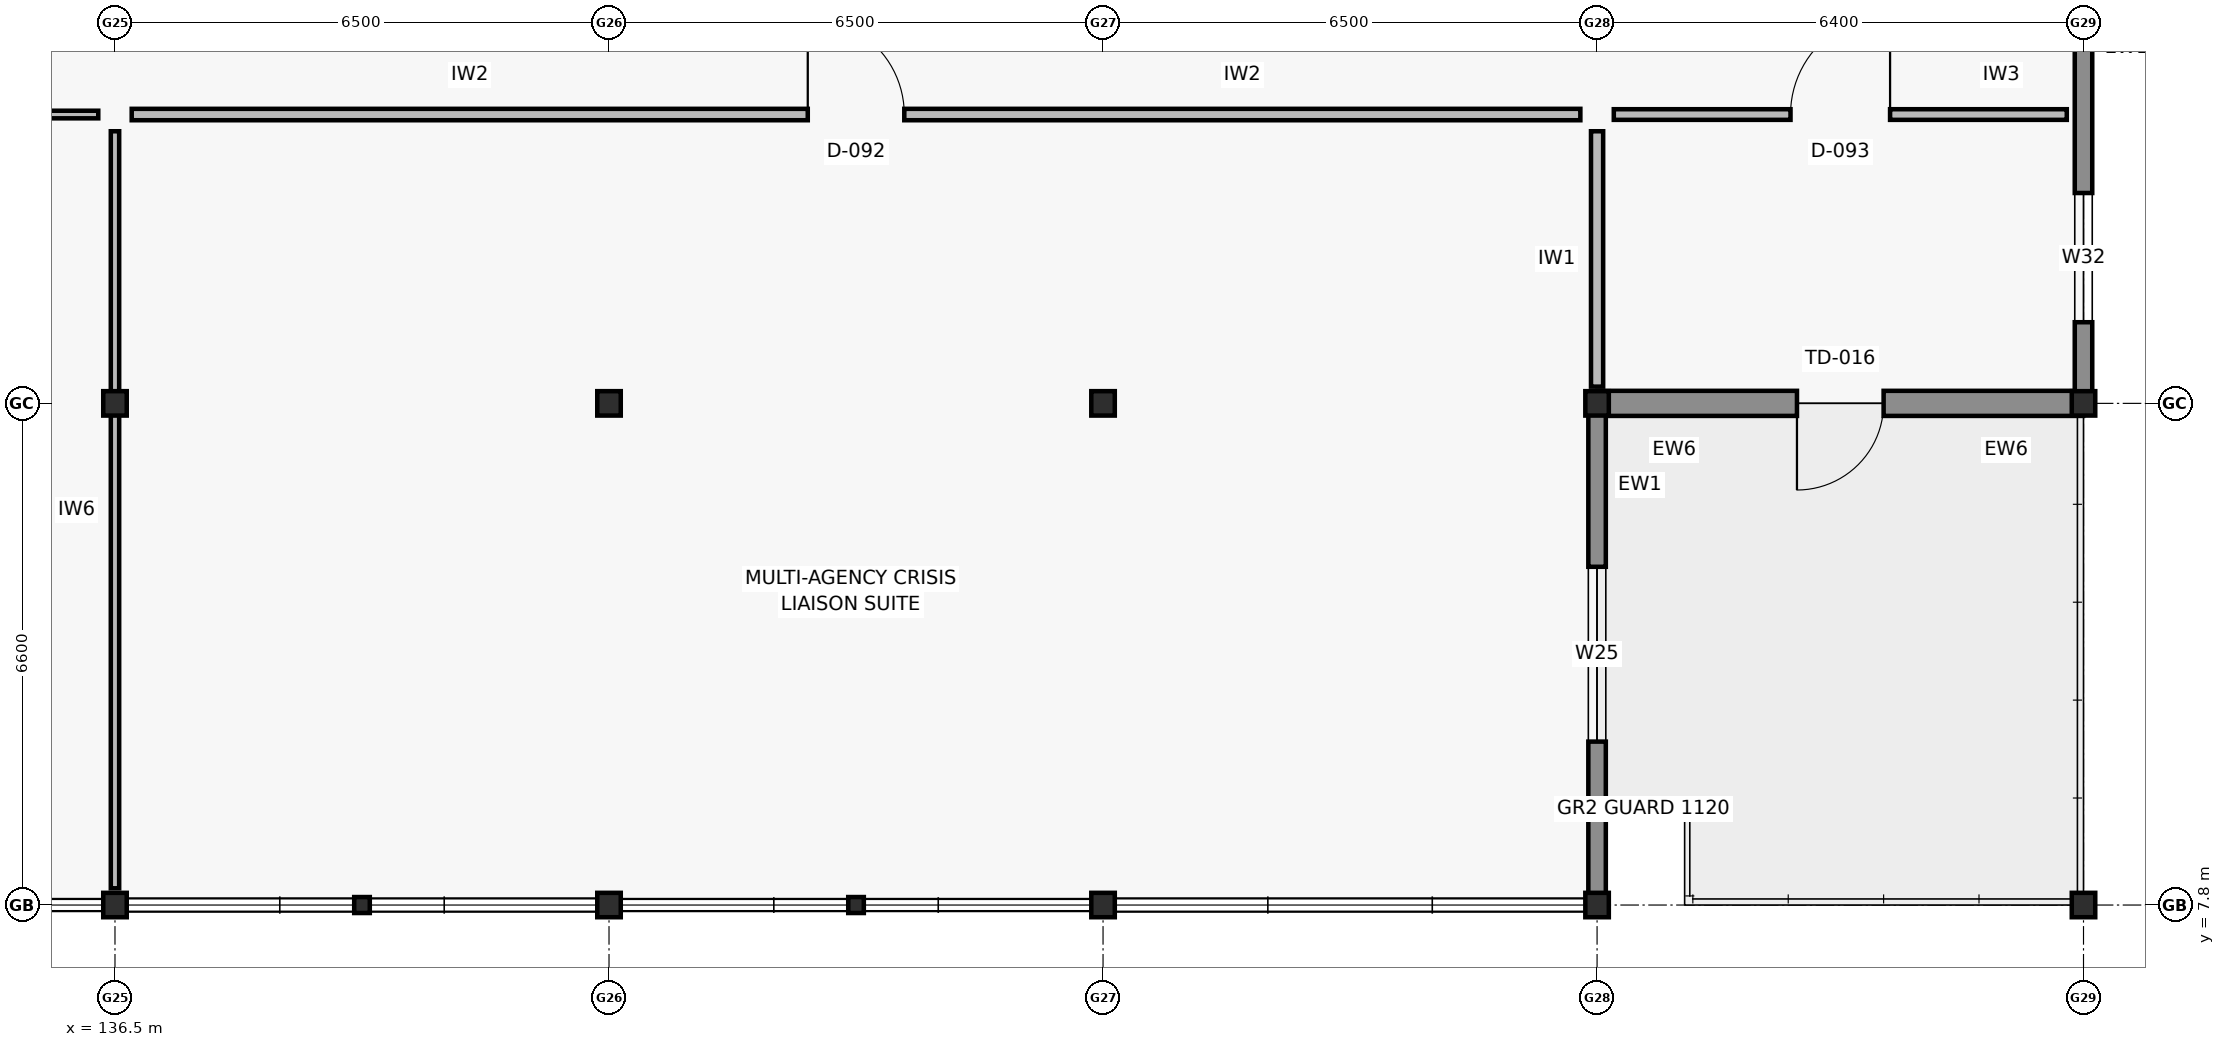
"""IFC4 building model, lengths in metres.
Left out: names, types, materials, properties, quantities, classifications, styles, units other than length and angle.
Written with IfcOpenShell. Run it as: python <this file> out.ifc"""

import sys

from ifc_helpers import new_model, si_unit, direction, frame, frame_2d, origin, origin_2d, place, context, subcontext, project, spatial, rectangle, i_section, extrude, element, fill, save


model = new_model("IFC4")
c1 = context("Model", 3, precision=1e-05, world=origin(), true_north=direction((0.0, 1.0)))
c2 = subcontext(c1, "Body", "Model", "MODEL_VIEW")
j1 = project(units=[si_unit("LENGTHUNIT", "METRE"), si_unit("PLANEANGLEUNIT", "RADIAN")], contexts=[c1])
p1 = place(None, origin())
s1 = spatial("IfcSite", under=j1, at=p1, CompositionType="ELEMENT")
p2 = place(p1, origin())
s2 = spatial("IfcBuilding", under=s1, at=p2, CompositionType="ELEMENT")
p3 = place(p2, frame((0.0, 0.0, 9.6)))
s3 = spatial("IfcBuildingStorey", under=s2, at=p3, CompositionType="ELEMENT", Elevation=9.6)
for number, where, z_axis, x_axis in (
    (1, (136.5, 7.8, 0.0), (0.0, 0.0, 1.0), (1.0, 0.0, 0.0)),
    (2, (136.5, 14.4, 0.0), (0.0, 0.0, 1.0), (1.0, 0.0, 0.0)),
    (3, (143.0, 7.8, 0.0), (0.0, 0.0, 1.0), (1.0, 0.0, 0.0)),
    (4, (143.0, 14.4, 0.0), (0.0, 0.0, 1.0), (1.0, 0.0, 0.0)),
    (5, (149.5, 7.8, 0.0), (0.0, 0.0, 1.0), (1.0, 0.0, 0.0)),
    (6, (149.5, 14.4, 0.0), (0.0, 0.0, 1.0), (1.0, 0.0, 0.0)),
    (7, (156.0, 7.8, 0.0), (0.0, 0.0, 1.0), (1.0, 0.0, 0.0)),
    (8, (156.0, 14.4, 0.0), (0.0, 0.0, 1.0), (1.0, 0.0, 0.0)),
    (9, (162.4, 7.8, 0.0), (0.0, 0.0, 1.0), (1.0, 0.0, 0.0)),
    (10, (162.4, 14.4, 0.0), (0.0, 0.0, 1.0), (1.0, 0.0, 0.0)),
):
    element("IfcColumn", number, at=place(p3, frame(where, z_axis=z_axis, x_axis=x_axis)), inside=s3, PredefinedType="COLUMN", context=c2, shape_type="SweptSolid", body=[
        extrude(i_section(OverallWidth=0.309, OverallDepth=0.321, WebThickness=0.014, FlangeThickness=0.022, FilletRadius=0.017, at=origin_2d()), origin(), (0.0, 0.0, 1.0), 3.9),
    ])
for number, where, z_axis, x_axis in (
    (11, (139.75, 7.8, 0.0), (0.0, 0.0, 1.0), (1.0, 0.0, 0.0)),
    (12, (146.25, 7.8, 0.0), (0.0, 0.0, 1.0), (1.0, 0.0, 0.0)),
):
    element("IfcColumn", number, at=place(p3, frame(where, z_axis=z_axis, x_axis=x_axis)), inside=s3, PredefinedType="PILASTER", context=c2, shape_type="SweptSolid", body=[
        extrude(i_section(OverallWidth=0.205, OverallDepth=0.21, WebThickness=0.009, FlangeThickness=0.014, FilletRadius=0.011, at=origin_2d()), origin(), (0.0, 0.0, 1.0), 3.9),
    ])
p4 = place(p3, frame((162.395, 14.4, 0.0), z_axis=(0.0, 0.0, 1.0), x_axis=(-1.0, 0.0, 0.0)))
e13 = element("IfcWall", 13, at=p4, inside=s3, PredefinedType="SOLIDWALL", context=c2, shape_type="SweptSolid", body=[
    extrude(rectangle(XDim=6.39, YDim=0.33, at=frame_2d((3.195, 0.0))), origin(), (0.0, 0.0, 1.0), 3.02),
])
p5 = place(p4, frame((2.625, 0.0, 0.0)))
e14 = element("IfcOpeningElement", 14, at=p5, cuts=e13, PredefinedType="OPENING", context=c2, shape_type="SweptSolid", body=[
    extrude(rectangle(XDim=1.14, YDim=2.14, at=frame_2d((0.57, 1.07))), frame((0.0, 0.175, 0.0), z_axis=(0.0, -1.0, 0.0), x_axis=(1.0, 0.0, 0.0)), (0.0, 0.0, 1.0), 0.35),
])
p6 = place(p3, frame((156.0, 14.395, 0.0), z_axis=(0.0, 0.0, 1.0), x_axis=(0.0, -1.0, 0.0)))
e15 = element("IfcWall", 15, at=p6, inside=s3, PredefinedType="SOLIDWALL", context=c2, shape_type="SweptSolid", body=[
    extrude(rectangle(XDim=6.59, YDim=0.23, at=frame_2d((3.295, 0.0))), origin(), (0.0, 0.0, 1.0), 3.02),
])
p7 = place(p6, frame((2.145, 0.0, 0.8)))
e16 = element("IfcOpeningElement", 16, at=p7, cuts=e15, PredefinedType="OPENING", context=c2, shape_type="SweptSolid", body=[
    extrude(rectangle(XDim=2.3, YDim=1.15, at=frame_2d((1.15, 0.575))), frame((0.0, 0.125, 0.0), z_axis=(0.0, -1.0, 0.0), x_axis=(1.0, 0.0, 0.0)), (0.0, 0.0, 1.0), 0.25),
])
p8 = place(p3, frame((162.4, 20.995, 0.0), z_axis=(0.0, 0.0, 1.0), x_axis=(0.0, -1.0, 0.0)))
e17 = element("IfcWall", 17, at=p8, inside=s3, PredefinedType="SOLIDWALL", context=c2, shape_type="SweptSolid", body=[
    extrude(rectangle(XDim=6.59, YDim=0.23, at=frame_2d((3.295, 0.0))), origin(), (0.0, 0.0, 1.0), 3.02),
])
p9 = place(p8, frame((3.827, 0.0, 0.8)))
e18 = element("IfcOpeningElement", 18, at=p9, cuts=e17, PredefinedType="OPENING", context=c2, shape_type="SweptSolid", body=[
    extrude(rectangle(XDim=1.7, YDim=1.25, at=frame_2d((0.85, 0.625))), frame((0.0, 0.125, 0.0), z_axis=(0.0, -1.0, 0.0), x_axis=(1.0, 0.0, 0.0)), (0.0, 0.0, 1.0), 0.25),
])
p10 = place(p3, frame((136.5, 8.02, 0.0), z_axis=(0.0, 0.0, 1.0), x_axis=(0.0, 1.0, 0.0)))
e19 = element("IfcWall", 19, at=p10, inside=s3, PredefinedType="PARTITIONING", context=c2, shape_type="SweptSolid", body=[
    extrude(rectangle(XDim=9.96, YDim=0.11, at=frame_2d((4.98, 0.0))), origin(), (0.0, 0.0, 1.0), 3.0),
])
p11 = place(p3, frame((104.22, 18.2, 0.0), z_axis=(0.0, 0.0, 1.0), x_axis=(1.0, 0.0, 0.0)))
e20 = element("IfcWall", 20, at=p11, inside=s3, PredefinedType="PARTITIONING", context=c2, shape_type="SweptSolid", body=[
    extrude(rectangle(XDim=32.06, YDim=0.1, at=frame_2d((16.03, 0.0))), origin(), (0.0, 0.0, 1.0), 3.0),
])
p12 = place(p11, frame((15.415, 0.0, 0.0)))
e21 = element("IfcOpeningElement", 21, at=p12, cuts=e20, PredefinedType="OPENING", context=c2, shape_type="SweptSolid", body=[
    extrude(rectangle(XDim=1.23, YDim=2.08, at=frame_2d((0.615, 1.04))), frame((0.0, 0.06, 0.0), z_axis=(0.0, -1.0, 0.0), x_axis=(1.0, 0.0, 0.0)), (0.0, 0.0, 1.0), 0.12),
])
p13 = place(p3, frame((156.0, 14.62, 0.0), z_axis=(0.0, 0.0, 1.0), x_axis=(0.0, 1.0, 0.0)))
e22 = element("IfcWall", 22, at=p13, inside=s3, PredefinedType="PARTITIONING", context=c2, shape_type="SweptSolid", body=[
    extrude(rectangle(XDim=3.36, YDim=0.16, at=frame_2d((1.68, 0.0))), origin(), (0.0, 0.0, 1.0), 3.0),
])
p14 = place(p3, frame((136.72, 18.2, 0.0), z_axis=(0.0, 0.0, 1.0), x_axis=(1.0, 0.0, 0.0)))
e23 = element("IfcWall", 23, at=p14, inside=s3, PredefinedType="PARTITIONING", context=c2, shape_type="SweptSolid", body=[
    extrude(rectangle(XDim=19.06, YDim=0.15, at=frame_2d((9.53, 0.0))), origin(), (0.0, 0.0, 1.0), 3.0),
])
p15 = place(p14, frame((8.895, 0.0, 0.0)))
e24 = element("IfcOpeningElement", 24, at=p15, cuts=e23, PredefinedType="OPENING", context=c2, shape_type="SweptSolid", body=[
    extrude(rectangle(XDim=1.27, YDim=2.1, at=frame_2d((0.635, 1.05))), frame((0.0, 0.085, 0.0), z_axis=(0.0, -1.0, 0.0), x_axis=(1.0, 0.0, 0.0)), (0.0, 0.0, 1.0), 0.17),
])
p16 = place(p3, frame((156.22, 18.2, 0.0), z_axis=(0.0, 0.0, 1.0), x_axis=(1.0, 0.0, 0.0)))
e25 = element("IfcWall", 25, at=p16, inside=s3, PredefinedType="PARTITIONING", context=c2, shape_type="SweptSolid", body=[
    extrude(rectangle(XDim=5.96, YDim=0.14, at=frame_2d((2.98, 0.0))), origin(), (0.0, 0.0, 1.0), 3.0),
])
p17 = place(p16, frame((2.325, 0.0, 0.0)))
e26 = element("IfcOpeningElement", 26, at=p17, cuts=e25, PredefinedType="OPENING", context=c2, shape_type="SweptSolid", body=[
    extrude(rectangle(XDim=1.31, YDim=2.14, at=frame_2d((0.655, 1.07))), frame((0.0, 0.08, 0.0), z_axis=(0.0, -1.0, 0.0), x_axis=(1.0, 0.0, 0.0)), (0.0, 0.0, 1.0), 0.16),
])
p18 = place(p5, origin())
e27 = element("IfcDoor", 27, at=p18, inside=s3, OperationType="SINGLE_SWING_RIGHT", PredefinedType="DOOR", context=c2, shape_type="SweptSolid", body=[
    extrude(rectangle(XDim=1.14, YDim=2.14, at=frame_2d((0.57, 1.07))), frame((0.0, 0.025, 0.0), z_axis=(0.0, -1.0, 0.0), x_axis=(1.0, 0.0, 0.0)), (0.0, 0.0, 1.0), 0.05),
])
fill(e14, e27)
p19 = place(p7, origin())
e28 = element("IfcWindow", 28, at=p19, inside=s3, PartitioningType="DOUBLE_PANEL_VERTICAL", PredefinedType="WINDOW", context=c2, shape_type="SweptSolid", body=[
    extrude(rectangle(XDim=2.3, YDim=1.15, at=frame_2d((1.15, 0.575))), frame((0.0, 0.03, 0.0), z_axis=(0.0, -1.0, 0.0), x_axis=(1.0, 0.0, 0.0)), (0.0, 0.0, 1.0), 0.06),
])
fill(e16, e28)
p20 = place(p9, origin())
e29 = element("IfcWindow", 29, at=p20, inside=s3, PartitioningType="DOUBLE_PANEL_VERTICAL", PredefinedType="WINDOW", context=c2, shape_type="SweptSolid", body=[
    extrude(rectangle(XDim=1.7, YDim=1.25, at=frame_2d((0.85, 0.625))), frame((0.0, 0.03, 0.0), z_axis=(0.0, -1.0, 0.0), x_axis=(1.0, 0.0, 0.0)), (0.0, 0.0, 1.0), 0.06),
])
fill(e18, e29)
p21 = place(p15, origin())
e30 = element("IfcDoor", 30, at=p21, inside=s3, OperationType="SINGLE_SWING_LEFT", PredefinedType="DOOR", context=c2, shape_type="SweptSolid", body=[
    extrude(rectangle(XDim=1.27, YDim=2.1, at=frame_2d((0.635, 1.05))), frame((0.0, 0.025, 0.0), z_axis=(0.0, -1.0, 0.0), x_axis=(1.0, 0.0, 0.0)), (0.0, 0.0, 1.0), 0.05),
])
fill(e24, e30)
p22 = place(p17, origin())
e31 = element("IfcDoor", 31, at=p22, inside=s3, OperationType="SINGLE_SWING_RIGHT", PredefinedType="DOOR", context=c2, shape_type="SweptSolid", body=[
    extrude(rectangle(XDim=1.31, YDim=2.14, at=frame_2d((0.655, 1.07))), frame((0.0, 0.025, 0.0), z_axis=(0.0, -1.0, 0.0), x_axis=(1.0, 0.0, 0.0)), (0.0, 0.0, 1.0), 0.05),
])
fill(e26, e31)
save(model, sys.argv[1])
